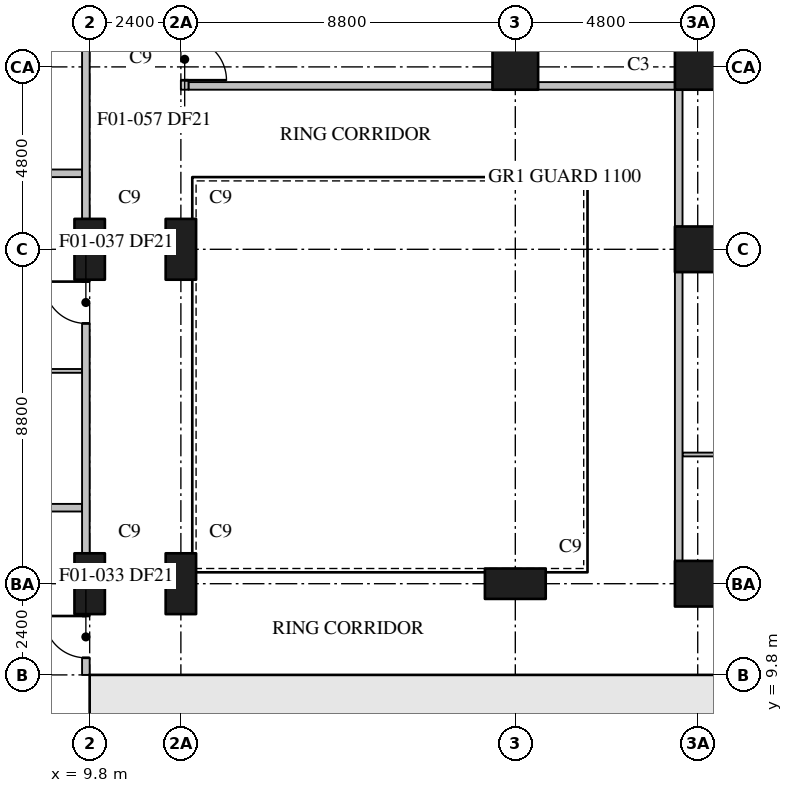
"""IFC4 building model, lengths in metres.
Left out: names, types, materials, properties, quantities, classifications, styles, units other than length and angle.
Written with IfcOpenShell. Run it as: python <this file> out.ifc"""

import sys

from ifc_helpers import new_model, si_unit, direction, frame, frame_2d, origin, origin_2d, place, context, subcontext, project, spatial, rectangle, extrude, element, fill, save


model = new_model("IFC4")
c1 = context("Model", 3, precision=1e-05, world=origin(), true_north=direction((0.0, 1.0)))
c2 = subcontext(c1, "Body", "Model", "MODEL_VIEW")
j1 = project(units=[si_unit("LENGTHUNIT", "METRE"), si_unit("PLANEANGLEUNIT", "RADIAN")], contexts=[c1])
p1 = place(None, origin())
s1 = spatial("IfcSite", under=j1, at=p1, CompositionType="ELEMENT")
p2 = place(p1, origin())
s2 = spatial("IfcBuilding", under=s1, at=p2, CompositionType="ELEMENT")
p3 = place(p2, frame((0.0, 0.0, 34.0)))
s3 = spatial("IfcBuildingStorey", under=s2, at=p3, CompositionType="ELEMENT", Elevation=34.0)
for number, where, z_axis, x_axis in (
    (1, (9.8, 12.2, 0.0), (0.0, 0.0, 1.0), (0.0, 1.0, 0.0)),
    (2, (9.8, 21.0, 0.0), (0.0, 0.0, 1.0), (0.0, 1.0, 0.0)),
    (3, (12.2, 12.2, 0.0), (0.0, 0.0, 1.0), (0.0, 1.0, 0.0)),
    (4, (12.2, 21.0, 0.0), (0.0, 0.0, 1.0), (0.0, 1.0, 0.0)),
    (5, (21.0, 12.2, 0.0), (0.0, 0.0, 1.0), (1.0, 0.0, 0.0)),
):
    element("IfcColumn", number, at=place(p3, frame(where, z_axis=z_axis, x_axis=x_axis)), inside=s3, PredefinedType="COLUMN", context=c2, shape_type="SweptSolid", body=[
        extrude(rectangle(XDim=1.6, YDim=0.8, at=origin_2d()), origin(), (0.0, 0.0, 1.0), 3.7),
    ])
for number, where, z_axis, x_axis in (
    (6, (21.0, 25.8, 0.0), (0.0, 0.0, 1.0), (1.0, 0.0, 0.0)),
    (7, (25.8, 12.2, 0.0), (0.0, 0.0, 1.0), (1.0, 0.0, 0.0)),
    (8, (25.8, 21.0, 0.0), (0.0, 0.0, 1.0), (1.0, 0.0, 0.0)),
    (9, (25.8, 25.8, 0.0), (0.0, 0.0, 1.0), (1.0, 0.0, 0.0)),
):
    element("IfcColumn", number, at=place(p3, frame(where, z_axis=z_axis, x_axis=x_axis)), inside=s3, PredefinedType="COLUMN", context=c2, shape_type="SweptSolid", body=[
        extrude(rectangle(XDim=1.2, YDim=1.2, at=origin_2d()), origin(), (0.0, 0.0, 1.0), 3.7),
    ])
p4 = place(p3, frame((10.5, 1.2, 0.0), z_axis=(0.0, 0.0, 1.0), x_axis=(0.0, 1.0, 0.0)))
e10 = element("IfcWall", 10, at=p4, inside=s3, PredefinedType="SHEAR", context=c2, shape_type="SweptSolid", body=[
    extrude(rectangle(XDim=8.6, YDim=1.0, at=frame_2d((4.3, 0.0))), origin(), (0.0, 0.0, 1.0), 3.7),
])
p5 = place(p3, frame((9.8, 9.6, 0.0), z_axis=(0.0, 0.0, 1.0), x_axis=(1.0, 0.0, 0.0)))
e11 = element("IfcWall", 11, at=p5, inside=s3, PredefinedType="SHEAR", context=c2, shape_type="SweptSolid", body=[
    extrude(rectangle(XDim=4.3, YDim=0.4, at=frame_2d((2.15, 0.0))), origin(), (0.0, 0.0, 1.0), 3.7),
])
p6 = place(p5, frame((2.05, 0.0, 0.0)))
e12 = element("IfcOpeningElement", 12, at=p6, cuts=e11, PredefinedType="OPENING", context=c2, shape_type="SweptSolid", body=[
    extrude(rectangle(XDim=1.2, YDim=2.1, at=frame_2d((0.6, 1.05))), frame((0.0, 0.21, 0.0), z_axis=(0.0, -1.0, 0.0), x_axis=(1.0, 0.0, 0.0)), (0.0, 0.0, 1.0), 0.42),
])
p7 = place(p3, frame((14.1, 9.6, 0.0), z_axis=(0.0, 0.0, 1.0), x_axis=(1.0, 0.0, 0.0)))
e13 = element("IfcWall", 13, at=p7, inside=s3, PredefinedType="SHEAR", context=c2, shape_type="SweptSolid", body=[
    extrude(rectangle(XDim=10.4, YDim=0.4, at=frame_2d((5.2, 0.0))), origin(), (0.0, 0.0, 1.0), 3.7),
])
p8 = place(p7, frame((0.8, 0.0, 0.0)))
e14 = element("IfcOpeningElement", 14, at=p8, cuts=e13, PredefinedType="OPENING", context=c2, shape_type="SweptSolid", body=[
    extrude(rectangle(XDim=1.0, YDim=2.1, at=frame_2d((0.5, 1.05))), frame((0.0, 0.21, 0.0), z_axis=(0.0, -1.0, 0.0), x_axis=(1.0, 0.0, 0.0)), (0.0, 0.0, 1.0), 0.42),
])
p9 = place(p7, frame((8.65, 0.0, 0.0)))
e15 = element("IfcOpeningElement", 15, at=p9, cuts=e13, PredefinedType="OPENING", context=c2, shape_type="SweptSolid", body=[
    extrude(rectangle(XDim=0.9, YDim=2.1, at=frame_2d((0.45, 1.05))), frame((0.0, 0.21, 0.0), z_axis=(0.0, -1.0, 0.0), x_axis=(1.0, 0.0, 0.0)), (0.0, 0.0, 1.0), 0.42),
])
p10 = place(p3, frame((14.1, 1.2, 0.0), z_axis=(0.0, 0.0, 1.0), x_axis=(0.0, 1.0, 0.0)))
e16 = element("IfcWall", 16, at=p10, inside=s3, PredefinedType="SHEAR", context=c2, shape_type="SweptSolid", body=[
    extrude(rectangle(XDim=8.4, YDim=0.4, at=frame_2d((4.2, 0.0))), origin(), (0.0, 0.0, 1.0), 3.7),
])
p11 = place(p10, frame((4.45, 0.0, 0.0)))
e17 = element("IfcOpeningElement", 17, at=p11, cuts=e16, PredefinedType="OPENING", context=c2, shape_type="SweptSolid", body=[
    extrude(rectangle(XDim=0.9, YDim=2.1, at=frame_2d((0.45, 1.05))), frame((0.0, 0.21, 0.0), z_axis=(0.0, -1.0, 0.0), x_axis=(1.0, 0.0, 0.0)), (0.0, 0.0, 1.0), 0.42),
])
p12 = place(p3, frame((24.5, 7.0, 0.0), z_axis=(0.0, 0.0, 1.0), x_axis=(0.0, 1.0, 0.0)))
e18 = element("IfcWall", 18, at=p12, inside=s3, PredefinedType="SHEAR", context=c2, shape_type="SweptSolid", body=[
    extrude(rectangle(XDim=2.4, YDim=0.25, at=frame_2d((1.2, 0.0))), origin(), (0.0, 0.0, 1.0), 3.7),
])
p13 = place(p3, frame((21.9, 7.0, 0.0), z_axis=(0.0, 0.0, 1.0), x_axis=(0.0, 1.0, 0.0)))
e19 = element("IfcWall", 19, at=p13, inside=s3, PredefinedType="PARTITIONING", context=c2, shape_type="SweptSolid", body=[
    extrude(rectangle(XDim=2.4, YDim=0.15, at=frame_2d((1.2, 0.0))), origin(), (0.0, 0.0, 1.0), 3.4),
])
p14 = place(p3, frame((25.3, 12.8, 0.0), z_axis=(0.0, 0.0, 1.0), x_axis=(0.0, 1.0, 0.0)))
e20 = element("IfcWall", 20, at=p14, inside=s3, PredefinedType="PARTITIONING", context=c2, shape_type="SweptSolid", body=[
    extrude(rectangle(XDim=7.6, YDim=0.2, at=frame_2d((3.8, 0.0))), origin(), (0.0, 0.0, 1.0), 3.4),
])
p15 = place(p3, frame((25.3, 21.6, 0.0), z_axis=(0.0, 0.0, 1.0), x_axis=(0.0, 1.0, 0.0)))
e21 = element("IfcWall", 21, at=p15, inside=s3, PredefinedType="PARTITIONING", context=c2, shape_type="SweptSolid", body=[
    extrude(rectangle(XDim=3.6, YDim=0.2, at=frame_2d((1.8, 0.0))), origin(), (0.0, 0.0, 1.0), 3.4),
])
p16 = place(p3, frame((9.7, 9.8, 0.0), z_axis=(0.0, 0.0, 1.0), x_axis=(0.0, 1.0, 0.0)))
e22 = element("IfcWall", 22, at=p16, inside=s3, PredefinedType="PARTITIONING", context=c2, shape_type="SweptSolid", body=[
    extrude(rectangle(XDim=1.6, YDim=0.2, at=frame_2d((0.8, 0.0))), origin(), (0.0, 0.0, 1.0), 3.4),
])
p17 = place(p16, frame((0.45, 0.0, 0.0)))
e23 = element("IfcOpeningElement", 23, at=p17, cuts=e22, PredefinedType="OPENING", context=c2, shape_type="SweptSolid", body=[
    extrude(rectangle(XDim=1.1, YDim=2.1, at=frame_2d((0.55, 1.05))), frame((0.0, 0.11, 0.0), z_axis=(0.0, -1.0, 0.0), x_axis=(1.0, 0.0, 0.0)), (0.0, 0.0, 1.0), 0.22),
])
p18 = place(p3, frame((9.7, 13.0, 0.0), z_axis=(0.0, 0.0, 1.0), x_axis=(0.0, 1.0, 0.0)))
e24 = element("IfcWall", 24, at=p18, inside=s3, PredefinedType="PARTITIONING", context=c2, shape_type="SweptSolid", body=[
    extrude(rectangle(XDim=7.2, YDim=0.2, at=frame_2d((3.6, 0.0))), origin(), (0.0, 0.0, 1.0), 3.4),
])
p19 = place(p18, frame((6.05, 0.0, 0.0)))
e25 = element("IfcOpeningElement", 25, at=p19, cuts=e24, PredefinedType="OPENING", context=c2, shape_type="SweptSolid", body=[
    extrude(rectangle(XDim=1.1, YDim=2.1, at=frame_2d((0.55, 1.05))), frame((0.0, 0.11, 0.0), z_axis=(0.0, -1.0, 0.0), x_axis=(1.0, 0.0, 0.0)), (0.0, 0.0, 1.0), 0.22),
])
p20 = place(p3, frame((9.7, 21.8, 0.0), z_axis=(0.0, 0.0, 1.0), x_axis=(0.0, 1.0, 0.0)))
e26 = element("IfcWall", 26, at=p20, inside=s3, PredefinedType="PARTITIONING", context=c2, shape_type="SweptSolid", body=[
    extrude(rectangle(XDim=4.8, YDim=0.2, at=frame_2d((2.4, 0.0))), origin(), (0.0, 0.0, 1.0), 3.4),
])
for number, where, z_axis, x_axis in (
    (27, (0.31, 14.2, 0.0), (0.0, 0.0, 1.0), (1.0, 0.0, 0.0)),
    (28, (0.31, 23.0, 0.0), (0.0, 0.0, 1.0), (1.0, 0.0, 0.0)),
):
    element("IfcWall", number, at=place(p3, frame(where, z_axis=z_axis, x_axis=x_axis)), inside=s3, PredefinedType="PARTITIONING", context=c2, shape_type="SweptSolid", body=[
        extrude(rectangle(XDim=9.29, YDim=0.2, at=frame_2d((4.645, 0.0))), origin(), (0.0, 0.0, 1.0), 3.4),
    ])
p21 = place(p3, frame((12.3, 26.6, 0.0), z_axis=(0.0, 0.0, 1.0), x_axis=(0.0, -1.0, 0.0)))
e29 = element("IfcWall", 29, at=p21, inside=s3, PredefinedType="PARTITIONING", context=c2, shape_type="SweptSolid", body=[
    extrude(rectangle(XDim=1.4, YDim=0.2, at=frame_2d((0.7, 0.0))), origin(), (0.0, 0.0, 1.0), 3.4),
])
p22 = place(p21, frame((0.05, 0.0, 0.0)))
e30 = element("IfcOpeningElement", 30, at=p22, cuts=e29, PredefinedType="OPENING", context=c2, shape_type="SweptSolid", body=[
    extrude(rectangle(XDim=1.1, YDim=2.1, at=frame_2d((0.55, 1.05))), frame((0.0, 0.11, 0.0), z_axis=(0.0, -1.0, 0.0), x_axis=(1.0, 0.0, 0.0)), (0.0, 0.0, 1.0), 0.22),
])
p23 = place(p3, frame((12.4, 25.3, 0.0), z_axis=(0.0, 0.0, 1.0), x_axis=(1.0, 0.0, 0.0)))
e31 = element("IfcWall", 31, at=p23, inside=s3, PredefinedType="PARTITIONING", context=c2, shape_type="SweptSolid", body=[
    extrude(rectangle(XDim=8.0, YDim=0.2, at=frame_2d((4.0, 0.0))), origin(), (0.0, 0.0, 1.0), 3.4),
])
p24 = place(p3, frame((21.6, 25.3, 0.0), z_axis=(0.0, 0.0, 1.0), x_axis=(1.0, 0.0, 0.0)))
e32 = element("IfcWall", 32, at=p24, inside=s3, PredefinedType="PARTITIONING", context=c2, shape_type="SweptSolid", body=[
    extrude(rectangle(XDim=3.6, YDim=0.2, at=frame_2d((1.8, 0.0))), origin(), (0.0, 0.0, 1.0), 3.4),
])
p25 = place(p3, frame((25.4, 15.6, 0.0), z_axis=(0.0, 0.0, 1.0), x_axis=(1.0, 0.0, 0.0)))
e33 = element("IfcWall", 33, at=p25, inside=s3, PredefinedType="PARTITIONING", context=c2, shape_type="SweptSolid", body=[
    extrude(rectangle(XDim=3.45, YDim=0.1, at=frame_2d((1.725, 0.0))), origin(), (0.0, 0.0, 1.0), 3.4),
])
p26 = place(p3, frame((9.6, 17.8, 0.0), z_axis=(0.0, 0.0, 1.0), x_axis=(-1.0, 0.0, 0.0)))
e34 = element("IfcWall", 34, at=p26, inside=s3, PredefinedType="PARTITIONING", context=c2, shape_type="SweptSolid", body=[
    extrude(rectangle(XDim=3.15, YDim=0.1, at=frame_2d((1.575, 0.0))), origin(), (0.0, 0.0, 1.0), 3.4),
])
p27 = place(p26, frame((1.05, 0.0, 0.0)))
e35 = element("IfcOpeningElement", 35, at=p27, cuts=e34, PredefinedType="OPENING", context=c2, shape_type="SweptSolid", body=[
    extrude(rectangle(XDim=0.9, YDim=2.1, at=frame_2d((0.45, 1.05))), frame((0.0, 0.06, 0.0), z_axis=(0.0, -1.0, 0.0), x_axis=(1.0, 0.0, 0.0)), (0.0, 0.0, 1.0), 0.12),
])
p28 = place(p8, frame((1.0, 0.0, 0.0), z_axis=(0.0, 0.0, 1.0), x_axis=(-1.0, 0.0, 0.0)))
e36 = element("IfcDoor", 36, at=p28, inside=s3, OperationType="SINGLE_SWING_RIGHT", PredefinedType="DOOR", context=c2, shape_type="SweptSolid", body=[
    extrude(rectangle(XDim=1.0, YDim=2.1, at=frame_2d((0.5, 1.05))), frame((0.0, 0.025, 0.0), z_axis=(0.0, -1.0, 0.0), x_axis=(1.0, 0.0, 0.0)), (0.0, 0.0, 1.0), 0.05),
])
fill(e14, e36)
p29 = place(p9, frame((0.9, 0.0, 0.0), z_axis=(0.0, 0.0, 1.0), x_axis=(-1.0, 0.0, 0.0)))
e37 = element("IfcDoor", 37, at=p29, inside=s3, OperationType="SINGLE_SWING_LEFT", PredefinedType="DOOR", context=c2, shape_type="SweptSolid", body=[
    extrude(rectangle(XDim=0.9, YDim=2.1, at=frame_2d((0.45, 1.05))), frame((0.0, 0.025, 0.0), z_axis=(0.0, -1.0, 0.0), x_axis=(1.0, 0.0, 0.0)), (0.0, 0.0, 1.0), 0.05),
])
fill(e15, e37)
p30 = place(p6, frame((1.2, 0.0, 0.0), z_axis=(0.0, 0.0, 1.0), x_axis=(-1.0, 0.0, 0.0)))
e38 = element("IfcDoor", 38, at=p30, inside=s3, OperationType="SINGLE_SWING_LEFT", PredefinedType="DOOR", context=c2, shape_type="SweptSolid", body=[
    extrude(rectangle(XDim=1.2, YDim=2.1, at=frame_2d((0.6, 1.05))), frame((0.0, 0.025, 0.0), z_axis=(0.0, -1.0, 0.0), x_axis=(1.0, 0.0, 0.0)), (0.0, 0.0, 1.0), 0.05),
])
fill(e12, e38)
p31 = place(p17, origin())
e39 = element("IfcDoor", 39, at=p31, inside=s3, OperationType="SINGLE_SWING_RIGHT", PredefinedType="DOOR", context=c2, shape_type="SweptSolid", body=[
    extrude(rectangle(XDim=1.1, YDim=2.1, at=frame_2d((0.55, 1.05))), frame((0.0, 0.025, 0.0), z_axis=(0.0, -1.0, 0.0), x_axis=(1.0, 0.0, 0.0)), (0.0, 0.0, 1.0), 0.05),
])
fill(e23, e39)
p32 = place(p19, origin())
e40 = element("IfcDoor", 40, at=p32, inside=s3, OperationType="SINGLE_SWING_RIGHT", PredefinedType="DOOR", context=c2, shape_type="SweptSolid", body=[
    extrude(rectangle(XDim=1.1, YDim=2.1, at=frame_2d((0.55, 1.05))), frame((0.0, 0.025, 0.0), z_axis=(0.0, -1.0, 0.0), x_axis=(1.0, 0.0, 0.0)), (0.0, 0.0, 1.0), 0.05),
])
fill(e25, e40)
p33 = place(p22, origin())
e41 = element("IfcDoor", 41, at=p33, inside=s3, OperationType="SINGLE_SWING_RIGHT", PredefinedType="DOOR", context=c2, shape_type="SweptSolid", body=[
    extrude(rectangle(XDim=1.1, YDim=2.1, at=frame_2d((0.55, 1.05))), frame((0.0, 0.025, 0.0), z_axis=(0.0, -1.0, 0.0), x_axis=(1.0, 0.0, 0.0)), (0.0, 0.0, 1.0), 0.05),
])
fill(e30, e41)
save(model, sys.argv[1])
